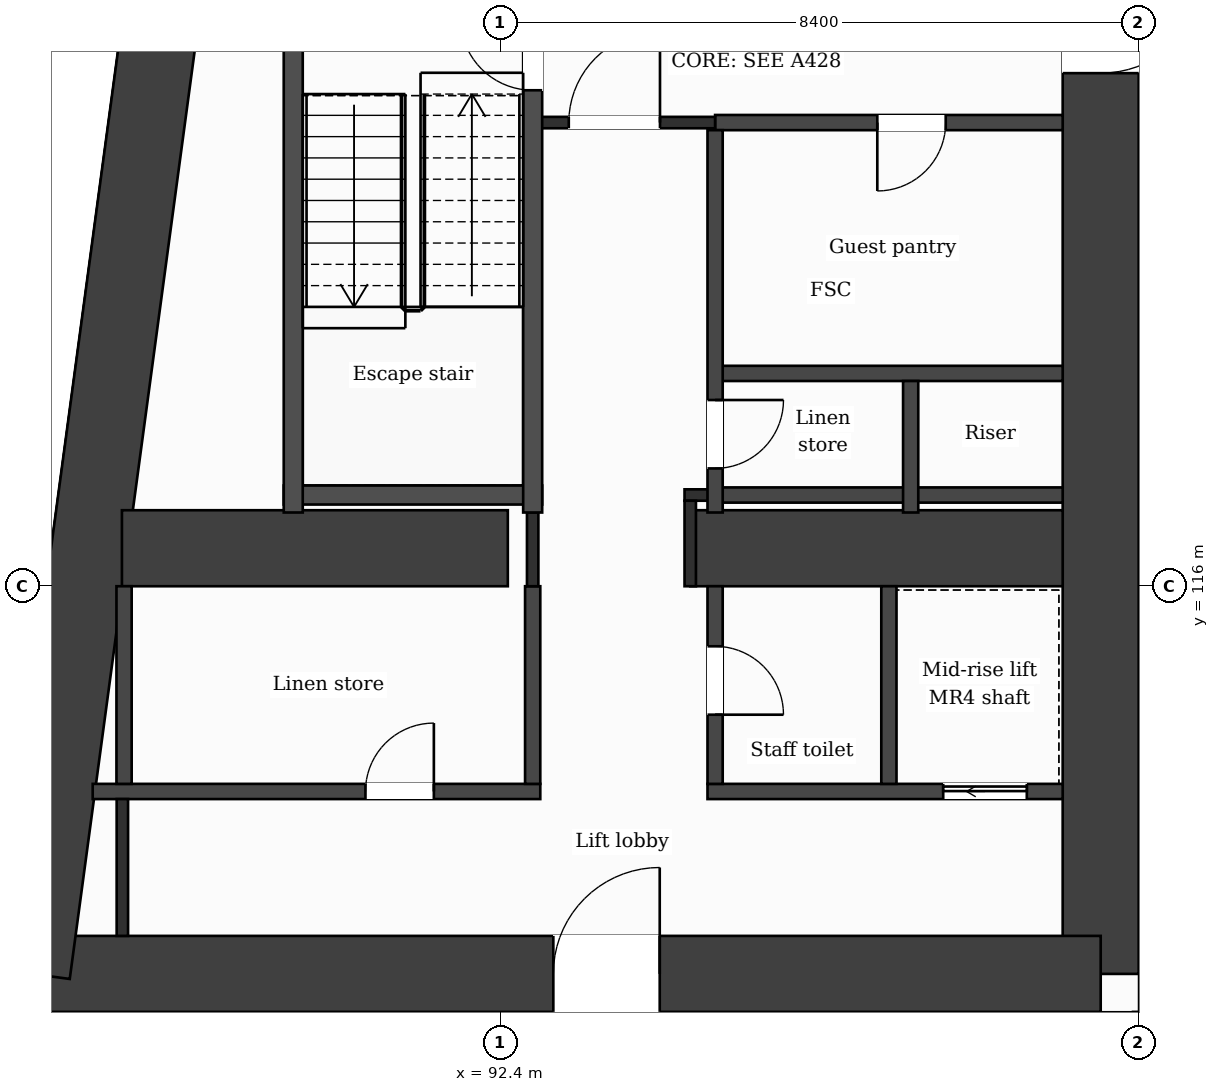
"""IFC4 building model, lengths in metres.
Left out: names, types, materials, properties, quantities, classifications, styles, units other than length and angle.
Written with IfcOpenShell. Run it as: python <this file> out.ifc"""

import sys

from ifc_helpers import new_model, si_unit, direction, frame, frame_2d, origin, place, context, subcontext, project, spatial, rectangle, extrude, element, fill, save


model = new_model("IFC4")
c1 = context("Model", 3, precision=1e-05, world=origin(), true_north=direction((0.0, 1.0)))
c2 = subcontext(c1, "Body", "Model", "MODEL_VIEW")
j1 = project(units=[si_unit("LENGTHUNIT", "METRE"), si_unit("PLANEANGLEUNIT", "RADIAN")], contexts=[c1])
p1 = place(None, origin())
s1 = spatial("IfcSite", under=j1, at=p1, CompositionType="ELEMENT")
p2 = place(p1, origin())
s2 = spatial("IfcBuilding", under=s1, at=p2, CompositionType="ELEMENT")
p3 = place(p2, frame((0.0, 0.0, 116.9)))
s3 = spatial("IfcBuildingStorey", under=s2, at=p3, CompositionType="ELEMENT", Elevation=116.9)
p4 = place(p3, frame((100.3, 131.9, 0.0), z_axis=(0.0, 0.0, 1.0), x_axis=(0.0, -1.0, 0.0)))
e1 = element("IfcWall", 1, at=p4, inside=s3, PredefinedType="SHEAR", context=c2, shape_type="SweptSolid", body=[
    extrude(rectangle(XDim=21.0, YDim=1.0, at=frame_2d((10.5, 0.0))), origin(), (0.0, 0.0, 1.0), 3.7),
])
p5 = place(p4, frame((7.75, 0.0, 0.0)))
e2 = element("IfcOpeningElement", 2, at=p5, cuts=e1, PredefinedType="OPENING", context=c2, shape_type="SweptSolid", body=[
    extrude(rectangle(XDim=1.4, YDim=2.1, at=frame_2d((0.7, 1.05))), frame((0.0, 0.51, 0.0), z_axis=(0.0, -1.0, 0.0), x_axis=(1.0, 0.0, 0.0)), (0.0, 0.0, 1.0), 1.02),
])
p6 = place(p3, frame((100.3, 110.9, 0.0), z_axis=(0.0, 0.0, 1.0), x_axis=(-1.0, 0.0, 0.0)))
e3 = element("IfcWall", 3, at=p6, inside=s3, PredefinedType="SHEAR", context=c2, shape_type="SweptSolid", body=[
    extrude(rectangle(XDim=14.059, YDim=1.0, at=frame_2d((7.03, 0.0))), origin(), (0.0, 0.0, 1.0), 3.7),
])
p7 = place(p6, frame((5.802, 0.0, 0.0)))
e4 = element("IfcOpeningElement", 4, at=p7, cuts=e3, PredefinedType="OPENING", context=c2, shape_type="SweptSolid", body=[
    extrude(rectangle(XDim=1.4, YDim=2.1, at=frame_2d((0.7, 1.05))), frame((0.0, 0.51, 0.0), z_axis=(0.0, -1.0, 0.0), x_axis=(1.0, 0.0, 0.0)), (0.0, 0.0, 1.0), 1.02),
])
p8 = place(p3, frame((86.241, 110.9, 0.0), z_axis=(0.0, 0.0, 1.0), x_axis=(0.133411141623, 0.991060778808, 0.0)))
e5 = element("IfcWall", 5, at=p8, inside=s3, PredefinedType="SHEAR", context=c2, shape_type="SweptSolid", body=[
    extrude(rectangle(XDim=21.189, YDim=1.0, at=frame_2d((10.595, 0.0))), origin(), (0.0, 0.0, 1.0), 3.7),
])
p9 = place(p3, frame((87.423, 116.5, 0.0), z_axis=(0.0, 0.0, 1.0), x_axis=(1.0, 0.0, 0.0)))
e6 = element("IfcWall", 6, at=p9, inside=s3, PredefinedType="SHEAR", context=c2, shape_type="SweptSolid", body=[
    extrude(rectangle(XDim=5.077, YDim=1.0, at=frame_2d((2.539, 0.0))), origin(), (0.0, 0.0, 1.0), 3.7),
])
p10 = place(p3, frame((94.9, 116.5, 0.0), z_axis=(0.0, 0.0, 1.0), x_axis=(1.0, 0.0, 0.0)))
e7 = element("IfcWall", 7, at=p10, inside=s3, PredefinedType="SHEAR", context=c2, shape_type="SweptSolid", body=[
    extrude(rectangle(XDim=4.9, YDim=1.0, at=frame_2d((2.45, 0.0))), origin(), (0.0, 0.0, 1.0), 3.7),
])
p11 = place(p3, frame((87.334, 110.4, 0.0), z_axis=(0.0, 0.0, 1.0), x_axis=(-0.133437175554, -0.991057273915, 0.0)))
e8 = element("IfcWall", 8, at=p11, inside=s3, PredefinedType="SOLIDWALL", context=c2, shape_type="SweptSolid", body=[
    extrude(rectangle(XDim=6.781, YDim=0.3, at=frame_2d((3.39, 0.0))), origin(), (0.0, 0.0, 1.0), 3.38),
])
p12 = place(p11, frame((1.418, 0.0, 0.0)))
e9 = element("IfcOpeningElement", 9, at=p12, cuts=e8, PredefinedType="OPENING", context=c2, shape_type="SweptSolid", body=[
    extrude(rectangle(XDim=1.2, YDim=2.4, at=frame_2d((0.6, 1.2))), frame((0.0, 0.16, 0.0), z_axis=(0.0, -1.0, 0.0), x_axis=(1.0, 0.0, 0.0)), (0.0, 0.0, 1.0), 0.32),
])
p13 = place(p11, frame((4.758, 0.0, 0.9)))
e10 = element("IfcOpeningElement", 10, at=p13, cuts=e8, PredefinedType="OPENING", context=c2, shape_type="SweptSolid", body=[
    extrude(rectangle(XDim=1.2, YDim=2.1, at=frame_2d((0.6, 1.05))), frame((0.0, 0.16, 0.0), z_axis=(0.0, -1.0, 0.0), x_axis=(1.0, 0.0, 0.0)), (0.0, 0.0, 1.0), 0.32),
])
p14 = place(p3, frame((87.039, 113.3, 0.0), z_axis=(0.0, 0.0, 1.0), x_axis=(1.0, 0.0, 0.0)))
e11 = element("IfcWall", 11, at=p14, inside=s3, PredefinedType="PARTITIONING", context=c2, shape_type="SweptSolid", body=[
    extrude(rectangle(XDim=5.888, YDim=0.2, at=frame_2d((2.944, 0.0))), origin(), (0.0, 0.0, 1.0), 3.38),
])
p15 = place(p14, frame((3.588, 0.0, 0.0)))
e12 = element("IfcOpeningElement", 12, at=p15, cuts=e11, PredefinedType="OPENING", context=c2, shape_type="SweptSolid", body=[
    extrude(rectangle(XDim=0.9, YDim=2.1, at=frame_2d((0.45, 1.05))), frame((0.0, 0.11, 0.0), z_axis=(0.0, -1.0, 0.0), x_axis=(1.0, 0.0, 0.0)), (0.0, 0.0, 1.0), 0.22),
])
p16 = place(p3, frame((95.127, 113.3, 0.0), z_axis=(0.0, 0.0, 1.0), x_axis=(1.0, 0.0, 0.0)))
e13 = element("IfcWall", 13, at=p16, inside=s3, PredefinedType="PARTITIONING", context=c2, shape_type="SweptSolid", body=[
    extrude(rectangle(XDim=4.673, YDim=0.2, at=frame_2d((2.336, 0.0))), origin(), (0.0, 0.0, 1.0), 3.38),
])
p17 = place(p16, frame((3.101, 0.0, 0.0)))
e14 = element("IfcOpeningElement", 14, at=p17, cuts=e13, PredefinedType="OPENING", context=c2, shape_type="SweptSolid", body=[
    extrude(rectangle(XDim=1.1, YDim=2.1, at=frame_2d((0.55, 1.05))), frame((0.0, 0.11, 0.0), z_axis=(0.0, -1.0, 0.0), x_axis=(1.0, 0.0, 0.0)), (0.0, 0.0, 1.0), 0.22),
])
p18 = place(p3, frame((95.227, 117.2, 0.0), z_axis=(0.0, 0.0, 1.0), x_axis=(1.0, 0.0, 0.0)))
e15 = element("IfcWall", 15, at=p18, inside=s3, PredefinedType="PARTITIONING", context=c2, shape_type="SweptSolid", body=[
    extrude(rectangle(XDim=4.573, YDim=0.2, at=frame_2d((2.287, 0.0))), origin(), (0.0, 0.0, 1.0), 3.38),
])
p19 = place(p3, frame((94.825, 117.2, 0.0), z_axis=(0.0, 0.0, 1.0), x_axis=(1.0, 0.0, 0.0)))
e16 = element("IfcWall", 16, at=p19, inside=s3, PredefinedType="PARTITIONING", context=c2, shape_type="SweptSolid", body=[
    extrude(rectangle(XDim=0.402, YDim=0.15, at=frame_2d((0.201, 0.0))), origin(), (0.0, 0.0, 1.0), 3.38),
])
p20 = place(p3, frame((89.552, 117.2, 0.0), z_axis=(0.0, 0.0, 1.0), x_axis=(1.0, 0.0, 0.0)))
e17 = element("IfcWall", 17, at=p20, inside=s3, PredefinedType="PARTITIONING", context=c2, shape_type="SweptSolid", body=[
    extrude(rectangle(XDim=3.4, YDim=0.25, at=frame_2d((1.7, 0.0))), origin(), (0.0, 0.0, 1.0), 3.38),
])
p21 = place(p3, frame((95.227, 118.8, 0.0), z_axis=(0.0, 0.0, 1.0), x_axis=(1.0, 0.0, 0.0)))
e18 = element("IfcWall", 18, at=p21, inside=s3, PredefinedType="PARTITIONING", context=c2, shape_type="SweptSolid", body=[
    extrude(rectangle(XDim=4.573, YDim=0.2, at=frame_2d((2.287, 0.0))), origin(), (0.0, 0.0, 1.0), 3.38),
])
p22 = place(p3, frame((95.227, 122.1, 0.0), z_axis=(0.0, 0.0, 1.0), x_axis=(1.0, 0.0, 0.0)))
e19 = element("IfcWall", 19, at=p22, inside=s3, PredefinedType="PARTITIONING", context=c2, shape_type="SweptSolid", body=[
    extrude(rectangle(XDim=4.573, YDim=0.2, at=frame_2d((2.287, 0.0))), origin(), (0.0, 0.0, 1.0), 3.38),
])
p23 = place(p22, frame((2.134, 0.0, 0.0)))
e20 = element("IfcOpeningElement", 20, at=p23, cuts=e19, PredefinedType="OPENING", context=c2, shape_type="SweptSolid", body=[
    extrude(rectangle(XDim=0.9, YDim=2.1, at=frame_2d((0.45, 1.05))), frame((0.0, 0.11, 0.0), z_axis=(0.0, -1.0, 0.0), x_axis=(1.0, 0.0, 0.0)), (0.0, 0.0, 1.0), 0.22),
])
p24 = place(p3, frame((92.827, 122.1, 0.0), z_axis=(0.0, 0.0, 1.0), x_axis=(1.0, 0.0, 0.0)))
e21 = element("IfcWall", 21, at=p24, inside=s3, PredefinedType="PARTITIONING", context=c2, shape_type="SweptSolid", body=[
    extrude(rectangle(XDim=2.4, YDim=0.15, at=frame_2d((1.2, 0.0))), origin(), (0.0, 0.0, 1.0), 3.38),
])
p25 = place(p24, frame((0.475, 0.0, 0.0)))
e22 = element("IfcOpeningElement", 22, at=p25, cuts=e21, PredefinedType="OPENING", context=c2, shape_type="SweptSolid", body=[
    extrude(rectangle(XDim=1.2, YDim=2.1, at=frame_2d((0.6, 1.05))), frame((0.0, 0.085, 0.0), z_axis=(0.0, -1.0, 0.0), x_axis=(1.0, 0.0, 0.0)), (0.0, 0.0, 1.0), 0.17),
])
p26 = place(p3, frame((87.451, 113.4, 0.0), z_axis=(0.0, 0.0, 1.0), x_axis=(0.0, 1.0, 0.0)))
e23 = element("IfcWall", 23, at=p26, inside=s3, PredefinedType="PARTITIONING", context=c2, shape_type="SweptSolid", body=[
    extrude(rectangle(XDim=2.6, YDim=0.2, at=frame_2d((1.3, 0.0))), origin(), (0.0, 0.0, 1.0), 3.38),
])
p27 = place(p3, frame((87.429, 111.4, 0.0), z_axis=(0.0, 0.0, 1.0), x_axis=(0.0, 1.0, 0.0)))
e24 = element("IfcWall", 24, at=p27, inside=s3, PredefinedType="PARTITIONING", context=c2, shape_type="SweptSolid", body=[
    extrude(rectangle(XDim=1.8, YDim=0.15, at=frame_2d((0.9, 0.0))), origin(), (0.0, 0.0, 1.0), 3.38),
])
p28 = place(p3, frame((89.677, 116.97, 0.0), z_axis=(0.0, 0.0, 1.0), x_axis=(0.0, 1.0, 0.0)))
e25 = element("IfcWall", 25, at=p28, inside=s3, PredefinedType="PARTITIONING", context=c2, shape_type="SweptSolid", body=[
    extrude(rectangle(XDim=6.855, YDim=0.25, at=frame_2d((3.427, 0.0))), origin(), (0.0, 0.0, 1.0), 3.38),
])
p29 = place(p3, frame((92.827, 113.4, 0.0), z_axis=(0.0, 0.0, 1.0), x_axis=(0.0, 1.0, 0.0)))
e26 = element("IfcWall", 26, at=p29, inside=s3, PredefinedType="PARTITIONING", context=c2, shape_type="SweptSolid", body=[
    extrude(rectangle(XDim=2.6, YDim=0.2, at=frame_2d((1.3, 0.0))), origin(), (0.0, 0.0, 1.0), 3.38),
])
p30 = place(p3, frame((92.827, 116.0, 0.0), z_axis=(0.0, 0.0, 1.0), x_axis=(0.0, 1.0, 0.0)))
e27 = element("IfcWall", 27, at=p30, inside=s3, PredefinedType="PARTITIONING", context=c2, shape_type="SweptSolid", body=[
    extrude(rectangle(XDim=0.97, YDim=0.15, at=frame_2d((0.485, 0.0))), origin(), (0.0, 0.0, 1.0), 3.38),
])
p31 = place(p3, frame((92.827, 116.97, 0.0), z_axis=(0.0, 0.0, 1.0), x_axis=(0.0, 1.0, 0.0)))
e28 = element("IfcWall", 28, at=p31, inside=s3, PredefinedType="PARTITIONING", context=c2, shape_type="SweptSolid", body=[
    extrude(rectangle(XDim=6.855, YDim=0.25, at=frame_2d((3.427, 0.0))), origin(), (0.0, 0.0, 1.0), 3.38),
])
p32 = place(p31, frame((5.555, 0.0, 0.0)))
e29 = element("IfcOpeningElement", 29, at=p32, cuts=e28, PredefinedType="OPENING", context=c2, shape_type="SweptSolid", body=[
    extrude(rectangle(XDim=0.95, YDim=2.1, at=frame_2d((0.475, 1.05))), frame((0.0, 0.135, 0.0), z_axis=(0.0, -1.0, 0.0), x_axis=(1.0, 0.0, 0.0)), (0.0, 0.0, 1.0), 0.27),
])
p33 = place(p3, frame((94.9, 116.0, 0.0), z_axis=(0.0, 0.0, 1.0), x_axis=(0.0, 1.0, 0.0)))
e30 = element("IfcWall", 30, at=p33, inside=s3, PredefinedType="PARTITIONING", context=c2, shape_type="SweptSolid", body=[
    extrude(rectangle(XDim=1.125, YDim=0.15, at=frame_2d((0.562, 0.0))), origin(), (0.0, 0.0, 1.0), 3.38),
])
p34 = place(p3, frame((95.227, 113.4, 0.0), z_axis=(0.0, 0.0, 1.0), x_axis=(0.0, 1.0, 0.0)))
e31 = element("IfcWall", 31, at=p34, inside=s3, PredefinedType="PARTITIONING", context=c2, shape_type="SweptSolid", body=[
    extrude(rectangle(XDim=2.6, YDim=0.2, at=frame_2d((1.3, 0.0))), origin(), (0.0, 0.0, 1.0), 3.38),
])
p35 = place(p34, frame((0.91, 0.0, 0.0)))
e32 = element("IfcOpeningElement", 32, at=p35, cuts=e31, PredefinedType="OPENING", context=c2, shape_type="SweptSolid", body=[
    extrude(rectangle(XDim=0.9, YDim=2.1, at=frame_2d((0.45, 1.05))), frame((0.0, 0.11, 0.0), z_axis=(0.0, -1.0, 0.0), x_axis=(1.0, 0.0, 0.0)), (0.0, 0.0, 1.0), 0.22),
])
p36 = place(p3, frame((95.227, 116.97, 0.0), z_axis=(0.0, 0.0, 1.0), x_axis=(0.0, 1.0, 0.0)))
e33 = element("IfcWall", 33, at=p36, inside=s3, PredefinedType="PARTITIONING", context=c2, shape_type="SweptSolid", body=[
    extrude(rectangle(XDim=5.03, YDim=0.2, at=frame_2d((2.515, 0.0))), origin(), (0.0, 0.0, 1.0), 3.38),
])
p37 = place(p36, frame((0.58, 0.0, 0.0)))
e34 = element("IfcOpeningElement", 34, at=p37, cuts=e33, PredefinedType="OPENING", context=c2, shape_type="SweptSolid", body=[
    extrude(rectangle(XDim=0.9, YDim=2.1, at=frame_2d((0.45, 1.05))), frame((0.0, 0.11, 0.0), z_axis=(0.0, -1.0, 0.0), x_axis=(1.0, 0.0, 0.0)), (0.0, 0.0, 1.0), 0.22),
])
p38 = place(p3, frame((97.513, 113.4, 0.0), z_axis=(0.0, 0.0, 1.0), x_axis=(0.0, 1.0, 0.0)))
e35 = element("IfcWall", 35, at=p38, inside=s3, PredefinedType="PARTITIONING", context=c2, shape_type="SweptSolid", body=[
    extrude(rectangle(XDim=2.6, YDim=0.2, at=frame_2d((1.3, 0.0))), origin(), (0.0, 0.0, 1.0), 3.38),
])
p39 = place(p3, frame((97.8, 116.97, 0.0), z_axis=(0.0, 0.0, 1.0), x_axis=(0.0, 1.0, 0.0)))
e36 = element("IfcWall", 36, at=p39, inside=s3, PredefinedType="PARTITIONING", context=c2, shape_type="SweptSolid", body=[
    extrude(rectangle(XDim=1.73, YDim=0.2, at=frame_2d((0.865, 0.0))), origin(), (0.0, 0.0, 1.0), 3.38),
])
p40 = place(p3, frame((100.8, 109.075, 0.0), z_axis=(0.0, 0.0, 1.0), x_axis=(0.0, 1.0, 0.0)))
e37 = element("IfcWall", 37, at=p40, inside=s3, PredefinedType="PARTITIONING", context=c2, shape_type="SweptSolid", body=[
    extrude(rectangle(XDim=1.325, YDim=0.15, at=frame_2d((0.663, 0.0))), origin(), (0.0, 0.0, 1.0), 3.38),
])
p41 = place(p25, origin())
e38 = element("IfcDoor", 38, at=p41, inside=s3, OperationType="SINGLE_SWING_RIGHT", PredefinedType="DOOR", context=c2, shape_type="SweptSolid", body=[
    extrude(rectangle(XDim=1.2, YDim=2.1, at=frame_2d((0.6, 1.05))), frame((0.0, 0.025, 0.0), z_axis=(0.0, -1.0, 0.0), x_axis=(1.0, 0.0, 0.0)), (0.0, 0.0, 1.0), 0.05),
])
fill(e22, e38)
p42 = place(p23, origin())
e39 = element("IfcDoor", 39, at=p42, inside=s3, OperationType="SINGLE_SWING_LEFT", PredefinedType="DOOR", context=c2, shape_type="SweptSolid", body=[
    extrude(rectangle(XDim=0.9, YDim=2.1, at=frame_2d((0.45, 1.05))), frame((0.0, 0.025, 0.0), z_axis=(0.0, -1.0, 0.0), x_axis=(1.0, 0.0, 0.0)), (0.0, 0.0, 1.0), 0.05),
])
fill(e20, e39)
p43 = place(p32, origin())
e40 = element("IfcDoor", 40, at=p43, inside=s3, OperationType="SINGLE_SWING_RIGHT", PredefinedType="DOOR", context=c2, shape_type="SweptSolid", body=[
    extrude(rectangle(XDim=0.95, YDim=2.1, at=frame_2d((0.475, 1.05))), frame((0.0, 0.025, 0.0), z_axis=(0.0, -1.0, 0.0), x_axis=(1.0, 0.0, 0.0)), (0.0, 0.0, 1.0), 0.05),
])
fill(e29, e40)
p44 = place(p37, origin())
e41 = element("IfcDoor", 41, at=p44, inside=s3, OperationType="SINGLE_SWING_RIGHT", PredefinedType="DOOR", context=c2, shape_type="SweptSolid", body=[
    extrude(rectangle(XDim=0.9, YDim=2.1, at=frame_2d((0.45, 1.05))), frame((0.0, 0.025, 0.0), z_axis=(0.0, -1.0, 0.0), x_axis=(1.0, 0.0, 0.0)), (0.0, 0.0, 1.0), 0.05),
])
fill(e34, e41)
p45 = place(p17, origin())
e42 = element("IfcDoor", 42, at=p45, inside=s3, OperationType="SLIDING_TO_LEFT", PredefinedType="DOOR", context=c2, shape_type="SweptSolid", body=[
    extrude(rectangle(XDim=1.1, YDim=2.1, at=frame_2d((0.55, 1.05))), frame((0.0, 0.025, 0.0), z_axis=(0.0, -1.0, 0.0), x_axis=(1.0, 0.0, 0.0)), (0.0, 0.0, 1.0), 0.05),
])
fill(e14, e42)
p46 = place(p15, origin())
e43 = element("IfcDoor", 43, at=p46, inside=s3, OperationType="SINGLE_SWING_RIGHT", PredefinedType="DOOR", context=c2, shape_type="SweptSolid", body=[
    extrude(rectangle(XDim=0.9, YDim=2.1, at=frame_2d((0.45, 1.05))), frame((0.0, 0.025, 0.0), z_axis=(0.0, -1.0, 0.0), x_axis=(1.0, 0.0, 0.0)), (0.0, 0.0, 1.0), 0.05),
])
fill(e12, e43)
p47 = place(p35, origin())
e44 = element("IfcDoor", 44, at=p47, inside=s3, OperationType="SINGLE_SWING_LEFT", PredefinedType="DOOR", context=c2, shape_type="SweptSolid", body=[
    extrude(rectangle(XDim=0.9, YDim=2.1, at=frame_2d((0.45, 1.05))), frame((0.0, 0.025, 0.0), z_axis=(0.0, -1.0, 0.0), x_axis=(1.0, 0.0, 0.0)), (0.0, 0.0, 1.0), 0.05),
])
fill(e32, e44)
p48 = place(p7, origin())
e45 = element("IfcDoor", 45, at=p48, inside=s3, OperationType="SINGLE_SWING_LEFT", PredefinedType="DOOR", context=c2, shape_type="SweptSolid", body=[
    extrude(rectangle(XDim=1.4, YDim=2.1, at=frame_2d((0.7, 1.05))), frame((0.0, 0.025, 0.0), z_axis=(0.0, -1.0, 0.0), x_axis=(1.0, 0.0, 0.0)), (0.0, 0.0, 1.0), 0.05),
])
fill(e4, e45)
p49 = place(p5, origin())
e46 = element("IfcDoor", 46, at=p49, inside=s3, OperationType="SINGLE_SWING_LEFT", PredefinedType="DOOR", context=c2, shape_type="SweptSolid", body=[
    extrude(rectangle(XDim=1.4, YDim=2.1, at=frame_2d((0.7, 1.05))), frame((0.0, 0.025, 0.0), z_axis=(0.0, -1.0, 0.0), x_axis=(1.0, 0.0, 0.0)), (0.0, 0.0, 1.0), 0.05),
])
fill(e2, e46)
save(model, sys.argv[1])
